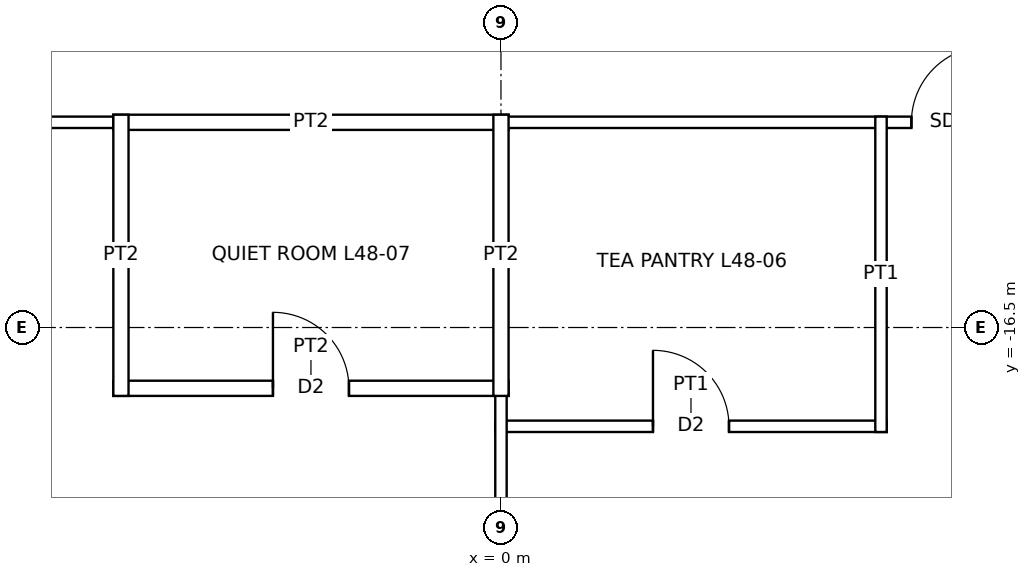
"""IFC4 building model, lengths in metres.
Left out: names, types, materials, properties, quantities, classifications, styles, units other than length and angle.
Written with IfcOpenShell. Run it as: python <this file> out.ifc"""

import sys

from ifc_helpers import new_model, si_unit, direction, frame, frame_2d, origin, place, context, subcontext, project, spatial, rectangle, extrude, element, fill, save


model = new_model("IFC4")
c1 = context("Model", 3, precision=1e-05, world=origin(), true_north=direction((0.0, 1.0)))
c2 = subcontext(c1, "Body", "Model", "MODEL_VIEW")
j1 = project(units=[si_unit("LENGTHUNIT", "METRE"), si_unit("PLANEANGLEUNIT", "RADIAN")], contexts=[c1])
p1 = place(None, origin())
s1 = spatial("IfcSite", under=j1, at=p1, CompositionType="ELEMENT")
p2 = place(p1, origin())
s2 = spatial("IfcBuilding", under=s1, at=p2, CompositionType="ELEMENT")
p3 = place(p2, frame((0.0, 0.0, 225.9)))
s3 = spatial("IfcBuildingStorey", under=s2, at=p3, CompositionType="ELEMENT", Elevation=225.9)
p4 = place(p3, frame((-0.075, -17.8, 0.0), z_axis=(0.0, 0.0, 1.0), x_axis=(1.0, 0.0, 0.0)))
e1 = element("IfcWall", 1, at=p4, inside=s3, PredefinedType="PARTITIONING", context=c2, shape_type="SweptSolid", body=[
    extrude(rectangle(XDim=5.15, YDim=0.15, at=frame_2d((2.575, 0.0))), origin(), (0.0, 0.0, 1.0), 3.85),
])
p5 = place(p4, frame((2.075, 0.0, 0.0)))
e2 = element("IfcOpeningElement", 2, at=p5, cuts=e1, PredefinedType="OPENING", context=c2, shape_type="SweptSolid", body=[
    extrude(rectangle(XDim=1.0, YDim=2.1, at=frame_2d((0.5, 1.05))), frame((0.0, 0.085, 0.0), z_axis=(0.0, -1.0, 0.0), x_axis=(1.0, 0.0, 0.0)), (0.0, 0.0, 1.0), 0.17),
])
p6 = place(p3, frame((-5.1, -17.3, 0.0), z_axis=(0.0, 0.0, 1.0), x_axis=(1.0, 0.0, 0.0)))
e3 = element("IfcWall", 3, at=p6, inside=s3, PredefinedType="PARTITIONING", context=c2, shape_type="SweptSolid", body=[
    extrude(rectangle(XDim=5.2, YDim=0.2, at=frame_2d((2.6, 0.0))), origin(), (0.0, 0.0, 1.0), 3.85),
])
p7 = place(p6, frame((2.1, 0.0, 0.0)))
e4 = element("IfcOpeningElement", 4, at=p7, cuts=e3, PredefinedType="OPENING", context=c2, shape_type="SweptSolid", body=[
    extrude(rectangle(XDim=1.0, YDim=2.1, at=frame_2d((0.5, 1.05))), frame((0.0, 0.11, 0.0), z_axis=(0.0, -1.0, 0.0), x_axis=(1.0, 0.0, 0.0)), (0.0, 0.0, 1.0), 0.22),
])
p8 = place(p3, frame((-13.875, -13.8, 0.0), z_axis=(0.0, 0.0, 1.0), x_axis=(1.0, 0.0, 0.0)))
e5 = element("IfcWall", 5, at=p8, inside=s3, PredefinedType="PARTITIONING", context=c2, shape_type="SweptSolid", body=[
    extrude(rectangle(XDim=8.95, YDim=0.15, at=frame_2d((4.475, 0.0))), origin(), (0.0, 0.0, 1.0), 3.85),
])
p9 = place(p8, frame((3.975, 0.0, 0.0)))
e6 = element("IfcOpeningElement", 6, at=p9, cuts=e5, PredefinedType="OPENING", context=c2, shape_type="SweptSolid", body=[
    extrude(rectangle(XDim=1.0, YDim=2.4, at=frame_2d((0.5, 1.2))), frame((0.0, 0.085, 0.0), z_axis=(0.0, -1.0, 0.0), x_axis=(1.0, 0.0, 0.0)), (0.0, 0.0, 1.0), 0.17),
])
p10 = place(p3, frame((-5.1, -13.8, 0.0), z_axis=(0.0, 0.0, 1.0), x_axis=(1.0, 0.0, 0.0)))
e7 = element("IfcWall", 7, at=p10, inside=s3, PredefinedType="PARTITIONING", context=c2, shape_type="SweptSolid", body=[
    extrude(rectangle(XDim=5.2, YDim=0.2, at=frame_2d((2.6, 0.0))), origin(), (0.0, 0.0, 1.0), 3.85),
])
p11 = place(p3, frame((-0.075, -13.8, 0.0), z_axis=(0.0, 0.0, 1.0), x_axis=(1.0, 0.0, 0.0)))
e8 = element("IfcWall", 8, at=p11, inside=s3, PredefinedType="PARTITIONING", context=c2, shape_type="SweptSolid", body=[
    extrude(rectangle(XDim=13.95, YDim=0.15, at=frame_2d((6.975, 0.0))), origin(), (0.0, 0.0, 1.0), 3.85),
])
p12 = place(p11, frame((5.475, 0.0, 0.0)))
e9 = element("IfcOpeningElement", 9, at=p12, cuts=e8, PredefinedType="OPENING", context=c2, shape_type="SweptSolid", body=[
    extrude(rectangle(XDim=1.0, YDim=2.4, at=frame_2d((0.5, 1.2))), frame((0.0, 0.085, 0.0), z_axis=(0.0, -1.0, 0.0), x_axis=(1.0, 0.0, 0.0)), (0.0, 0.0, 1.0), 0.17),
])
p13 = place(p3, frame((-5.0, -17.4, 0.0), z_axis=(0.0, 0.0, 1.0), x_axis=(0.0, 1.0, 0.0)))
e10 = element("IfcWall", 10, at=p13, inside=s3, PredefinedType="PARTITIONING", context=c2, shape_type="SweptSolid", body=[
    extrude(rectangle(XDim=3.7, YDim=0.2, at=frame_2d((1.85, 0.0))), origin(), (0.0, 0.0, 1.0), 3.85),
])
p14 = place(p3, frame((0.0, -20.99, 0.0), z_axis=(0.0, 0.0, 1.0), x_axis=(0.0, 1.0, 0.0)))
e11 = element("IfcWall", 11, at=p14, inside=s3, PredefinedType="PARTITIONING", context=c2, shape_type="SweptSolid", body=[
    extrude(rectangle(XDim=3.765, YDim=0.15, at=frame_2d((1.882, 0.0))), origin(), (0.0, 0.0, 1.0), 3.238),
])
p15 = place(p3, frame((0.0, -17.4, 0.0), z_axis=(0.0, 0.0, 1.0), x_axis=(0.0, 1.0, 0.0)))
e12 = element("IfcWall", 12, at=p15, inside=s3, PredefinedType="PARTITIONING", context=c2, shape_type="SweptSolid", body=[
    extrude(rectangle(XDim=3.7, YDim=0.2, at=frame_2d((1.85, 0.0))), origin(), (0.0, 0.0, 1.0), 3.238),
])
p16 = place(p3, frame((5.0, -17.875, 0.0), z_axis=(0.0, 0.0, 1.0), x_axis=(0.0, 1.0, 0.0)))
e13 = element("IfcWall", 13, at=p16, inside=s3, PredefinedType="PARTITIONING", context=c2, shape_type="SweptSolid", body=[
    extrude(rectangle(XDim=4.15, YDim=0.15, at=frame_2d((2.075, 0.0))), origin(), (0.0, 0.0, 1.0), 3.85),
])
p17 = place(p5, origin())
e14 = element("IfcDoor", 14, at=p17, inside=s3, OperationType="SINGLE_SWING_LEFT", PredefinedType="DOOR", context=c2, shape_type="SweptSolid", body=[
    extrude(rectangle(XDim=1.0, YDim=2.1, at=frame_2d((0.5, 1.05))), frame((0.0, 0.025, 0.0), z_axis=(0.0, -1.0, 0.0), x_axis=(1.0, 0.0, 0.0)), (0.0, 0.0, 1.0), 0.05),
])
fill(e2, e14)
p18 = place(p7, origin())
e15 = element("IfcDoor", 15, at=p18, inside=s3, OperationType="SINGLE_SWING_LEFT", PredefinedType="DOOR", context=c2, shape_type="SweptSolid", body=[
    extrude(rectangle(XDim=1.0, YDim=2.1, at=frame_2d((0.5, 1.05))), frame((0.0, 0.025, 0.0), z_axis=(0.0, -1.0, 0.0), x_axis=(1.0, 0.0, 0.0)), (0.0, 0.0, 1.0), 0.05),
])
fill(e4, e15)
p19 = place(p12, origin())
e16 = element("IfcDoor", 16, at=p19, inside=s3, OperationType="SINGLE_SWING_RIGHT", PredefinedType="DOOR", context=c2, shape_type="SweptSolid", body=[
    extrude(rectangle(XDim=1.0, YDim=2.4, at=frame_2d((0.5, 1.2))), frame((0.0, 0.025, 0.0), z_axis=(0.0, -1.0, 0.0), x_axis=(1.0, 0.0, 0.0)), (0.0, 0.0, 1.0), 0.05),
])
fill(e9, e16)
save(model, sys.argv[1])
